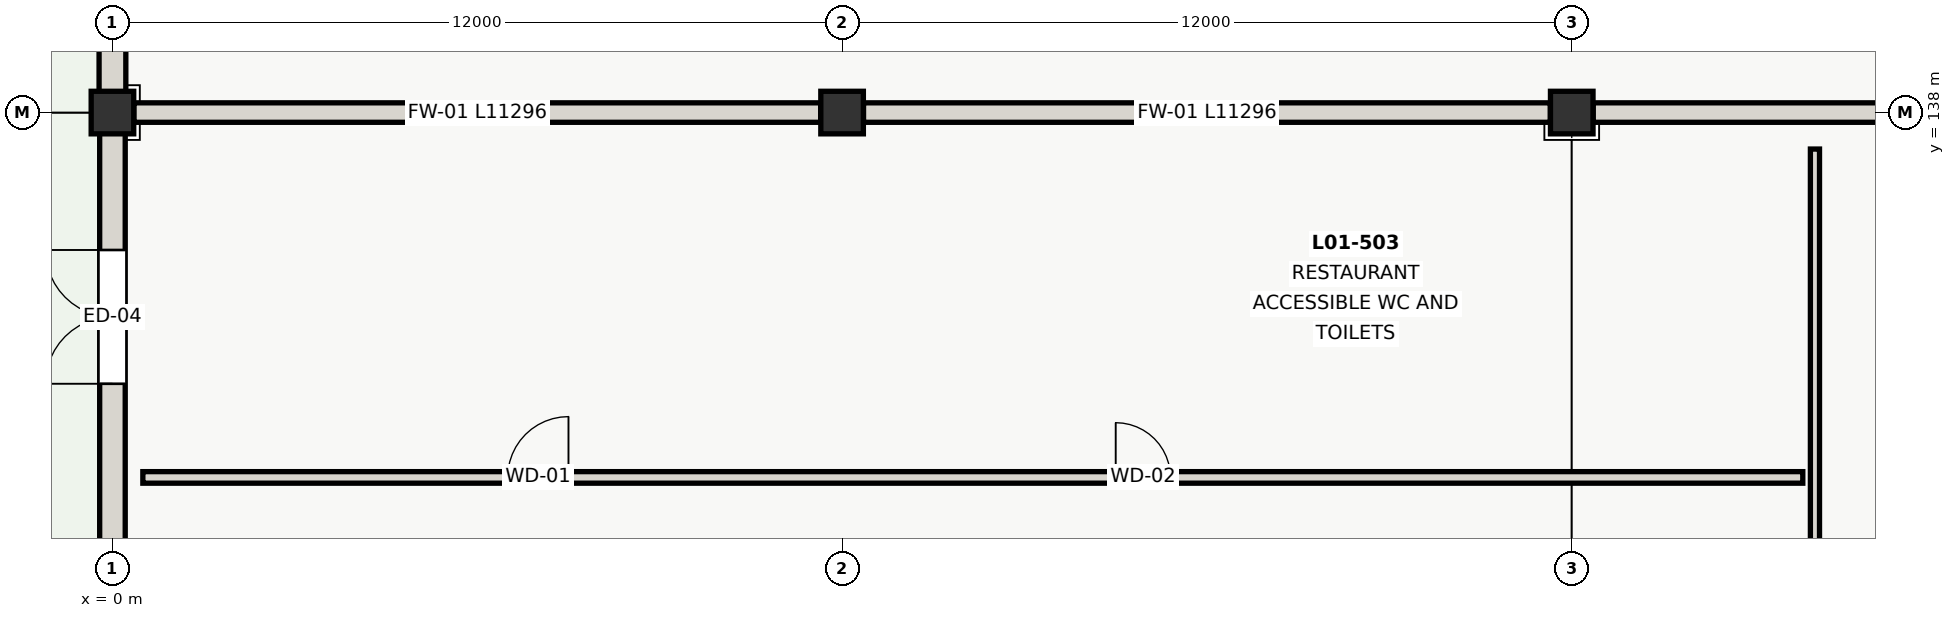
"""IFC4 building model, lengths in metres.
Left out: names, types, materials, properties, quantities, classifications, styles, units other than length and angle.
Written with IfcOpenShell. Run it as: python <this file> out.ifc"""

import sys

from ifc_helpers import new_model, si_unit, direction, frame, frame_2d, origin, origin_2d, place, context, subcontext, project, spatial, rectangle, extrude, element, fill, save


model = new_model("IFC4")
c1 = context("Model", 3, precision=1e-05, world=origin(), true_north=direction((0.0, 1.0)))
c2 = subcontext(c1, "Body", "Model", "MODEL_VIEW")
j1 = project(units=[si_unit("LENGTHUNIT", "METRE"), si_unit("PLANEANGLEUNIT", "RADIAN")], contexts=[c1])
p1 = place(None, origin())
s1 = spatial("IfcSite", under=j1, at=p1, CompositionType="ELEMENT")
p2 = place(p1, origin())
s2 = spatial("IfcBuilding", under=s1, at=p2, CompositionType="ELEMENT")
p3 = place(p2, origin())
s3 = spatial("IfcBuildingStorey", under=s2, at=p3, CompositionType="ELEMENT", Elevation=0.0)
for number, where, z_axis, x_axis in (
    (1, (0.0, 138.0, 0.0), (0.0, 0.0, 1.0), (1.0, 0.0, 0.0)),
    (2, (12.0, 138.0, 0.0), (0.0, 0.0, 1.0), (1.0, 0.0, 0.0)),
    (3, (24.0, 138.0, 0.0), (0.0, 0.0, 1.0), (1.0, 0.0, 0.0)),
):
    element("IfcColumn", number, at=place(p3, frame(where, z_axis=z_axis, x_axis=x_axis)), inside=s3, PredefinedType="COLUMN", context=c2, shape_type="SweptSolid", body=[
        extrude(rectangle(XDim=0.7, YDim=0.7, at=origin_2d()), origin(), (0.0, 0.0, 1.0), 4.2),
    ])
p4 = place(p3, frame((0.0, 126.0, 0.0), z_axis=(0.0, 0.0, 1.0), x_axis=(0.0, 1.0, 0.0)))
e4 = element("IfcWall", 4, at=p4, inside=s3, PredefinedType="SOLIDWALL", context=c2, shape_type="SweptSolid", body=[
    extrude(rectangle(XDim=12.0, YDim=0.42, at=frame_2d((6.0, 0.0))), origin(), (0.0, 0.0, 1.0), 3.5),
])
p5 = place(p4, frame((2.26, 0.0, 0.0)))
e5 = element("IfcOpeningElement", 5, at=p5, cuts=e4, PredefinedType="OPENING", context=c2, shape_type="SweptSolid", body=[
    extrude(rectangle(XDim=2.2, YDim=2.5, at=frame_2d((1.1, 1.25))), frame((0.0, 0.22, 0.0), z_axis=(0.0, -1.0, 0.0), x_axis=(1.0, 0.0, 0.0)), (0.0, 0.0, 1.0), 0.44),
])
p6 = place(p4, frame((7.54, 0.0, 0.0)))
e6 = element("IfcOpeningElement", 6, at=p6, cuts=e4, PredefinedType="OPENING", context=c2, shape_type="SweptSolid", body=[
    extrude(rectangle(XDim=2.2, YDim=2.5, at=frame_2d((1.1, 1.25))), frame((0.0, 0.22, 0.0), z_axis=(0.0, -1.0, 0.0), x_axis=(1.0, 0.0, 0.0)), (0.0, 0.0, 1.0), 0.44),
])
p7 = place(p3, frame((0.0, 138.0, 0.0), z_axis=(0.0, 0.0, 1.0), x_axis=(0.0, 1.0, 0.0)))
e7 = element("IfcWall", 7, at=p7, inside=s3, PredefinedType="SHEAR", context=c2, shape_type="SweptSolid", body=[
    extrude(rectangle(XDim=12.0, YDim=0.44, at=frame_2d((6.0, 0.0))), origin(), (0.0, 0.0, 1.0), 5.15),
])
p8 = place(p7, frame((2.8, 0.0, 0.0)))
e8 = element("IfcOpeningElement", 8, at=p8, cuts=e7, PredefinedType="OPENING", context=c2, shape_type="SweptSolid", body=[
    extrude(rectangle(XDim=6.4, YDim=4.5, at=frame_2d((3.2, 2.25))), frame((0.0, 0.23, 0.0), z_axis=(0.0, -1.0, 0.0), x_axis=(1.0, 0.0, 0.0)), (0.0, 0.0, 1.0), 0.46),
])
for number, where, z_axis, x_axis in (
    (9, (0.352, 138.0, 0.0), (0.0, 0.0, 1.0), (1.0, 0.0, 0.0)),
    (10, (12.352, 138.0, 0.0), (0.0, 0.0, 1.0), (1.0, 0.0, 0.0)),
    (11, (24.352, 138.0, 0.0), (0.0, 0.0, 1.0), (1.0, 0.0, 0.0)),
):
    element("IfcWall", number, at=place(p3, frame(where, z_axis=z_axis, x_axis=x_axis)), inside=s3, PredefinedType="SHEAR", context=c2, shape_type="SweptSolid", body=[
        extrude(rectangle(XDim=11.296, YDim=0.32, at=frame_2d((5.648, 0.0))), origin(), (0.0, 0.0, 1.0), 3.8),
    ])
p9 = place(p3, frame((28.0, 84.6, 0.0), z_axis=(0.0, 0.0, 1.0), x_axis=(0.0, 1.0, 0.0)))
e12 = element("IfcWall", 12, at=p9, inside=s3, PredefinedType="PARTITIONING", context=c2, shape_type="SweptSolid", body=[
    extrude(rectangle(XDim=52.8, YDim=0.15, at=frame_2d((26.4, 0.0))), origin(), (0.0, 0.0, 1.0), 3.72),
])
p10 = place(p9, frame((8.0, 0.0, 0.0)))
e13 = element("IfcOpeningElement", 13, at=p10, cuts=e12, PredefinedType="OPENING", context=c2, shape_type="SweptSolid", body=[
    extrude(rectangle(XDim=1.5, YDim=2.15, at=frame_2d((0.75, 1.075))), frame((0.0, 0.085, 0.0), z_axis=(0.0, -1.0, 0.0), x_axis=(1.0, 0.0, 0.0)), (0.0, 0.0, 1.0), 0.17),
])
p11 = place(p9, frame((22.0, 0.0, 0.0)))
e14 = element("IfcOpeningElement", 14, at=p11, cuts=e12, PredefinedType="OPENING", context=c2, shape_type="SweptSolid", body=[
    extrude(rectangle(XDim=1.05, YDim=2.1, at=frame_2d((0.525, 1.05))), frame((0.0, 0.085, 0.0), z_axis=(0.0, -1.0, 0.0), x_axis=(1.0, 0.0, 0.0)), (0.0, 0.0, 1.0), 0.17),
])
p12 = place(p9, frame((38.0, 0.0, 0.0)))
e15 = element("IfcOpeningElement", 15, at=p12, cuts=e12, PredefinedType="OPENING", context=c2, shape_type="SweptSolid", body=[
    extrude(rectangle(XDim=0.98, YDim=2.1, at=frame_2d((0.49, 1.05))), frame((0.0, 0.085, 0.0), z_axis=(0.0, -1.0, 0.0), x_axis=(1.0, 0.0, 0.0)), (0.0, 0.0, 1.0), 0.17),
])
p13 = place(p3, frame((0.5, 132.0, 0.0), z_axis=(0.0, 0.0, 1.0), x_axis=(1.0, 0.0, 0.0)))
e16 = element("IfcWall", 16, at=p13, inside=s3, PredefinedType="PLUMBINGWALL", context=c2, shape_type="SweptSolid", body=[
    extrude(rectangle(XDim=27.3, YDim=0.19, at=frame_2d((13.65, 0.0))), origin(), (0.0, 0.0, 1.0), 3.72),
])
p14 = place(p13, frame((6.0, 0.0, 0.0)))
e17 = element("IfcOpeningElement", 17, at=p14, cuts=e16, PredefinedType="OPENING", context=c2, shape_type="SweptSolid", body=[
    extrude(rectangle(XDim=1.0, YDim=2.1, at=frame_2d((0.5, 1.05))), frame((0.0, 0.105, 0.0), z_axis=(0.0, -1.0, 0.0), x_axis=(1.0, 0.0, 0.0)), (0.0, 0.0, 1.0), 0.21),
])
p15 = place(p13, frame((16.0, 0.0, 0.0)))
e18 = element("IfcOpeningElement", 18, at=p15, cuts=e16, PredefinedType="OPENING", context=c2, shape_type="SweptSolid", body=[
    extrude(rectangle(XDim=0.9, YDim=2.05, at=frame_2d((0.45, 1.025))), frame((0.0, 0.105, 0.0), z_axis=(0.0, -1.0, 0.0), x_axis=(1.0, 0.0, 0.0)), (0.0, 0.0, 1.0), 0.21),
])
p16 = place(p6, origin())
e19 = element("IfcDoor", 19, at=p16, inside=s3, OperationType="DOUBLE_DOOR_SINGLE_SWING", PredefinedType="DOOR", context=c2, shape_type="SweptSolid", body=[
    extrude(rectangle(XDim=2.2, YDim=2.5, at=frame_2d((1.1, 1.25))), frame((0.0, 0.025, 0.0), z_axis=(0.0, -1.0, 0.0), x_axis=(1.0, 0.0, 0.0)), (0.0, 0.0, 1.0), 0.05),
])
fill(e6, e19)
p17 = place(p14, origin())
e20 = element("IfcDoor", 20, at=p17, inside=s3, OperationType="SINGLE_SWING_RIGHT", PredefinedType="DOOR", context=c2, shape_type="SweptSolid", body=[
    extrude(rectangle(XDim=1.0, YDim=2.1, at=frame_2d((0.5, 1.05))), frame((0.0, 0.025, 0.0), z_axis=(0.0, -1.0, 0.0), x_axis=(1.0, 0.0, 0.0)), (0.0, 0.0, 1.0), 0.05),
])
fill(e17, e20)
p18 = place(p15, origin())
e21 = element("IfcDoor", 21, at=p18, inside=s3, OperationType="SINGLE_SWING_LEFT", PredefinedType="DOOR", context=c2, shape_type="SweptSolid", body=[
    extrude(rectangle(XDim=0.9, YDim=2.05, at=frame_2d((0.45, 1.025))), frame((0.0, 0.025, 0.0), z_axis=(0.0, -1.0, 0.0), x_axis=(1.0, 0.0, 0.0)), (0.0, 0.0, 1.0), 0.05),
])
fill(e18, e21)
save(model, sys.argv[1])
